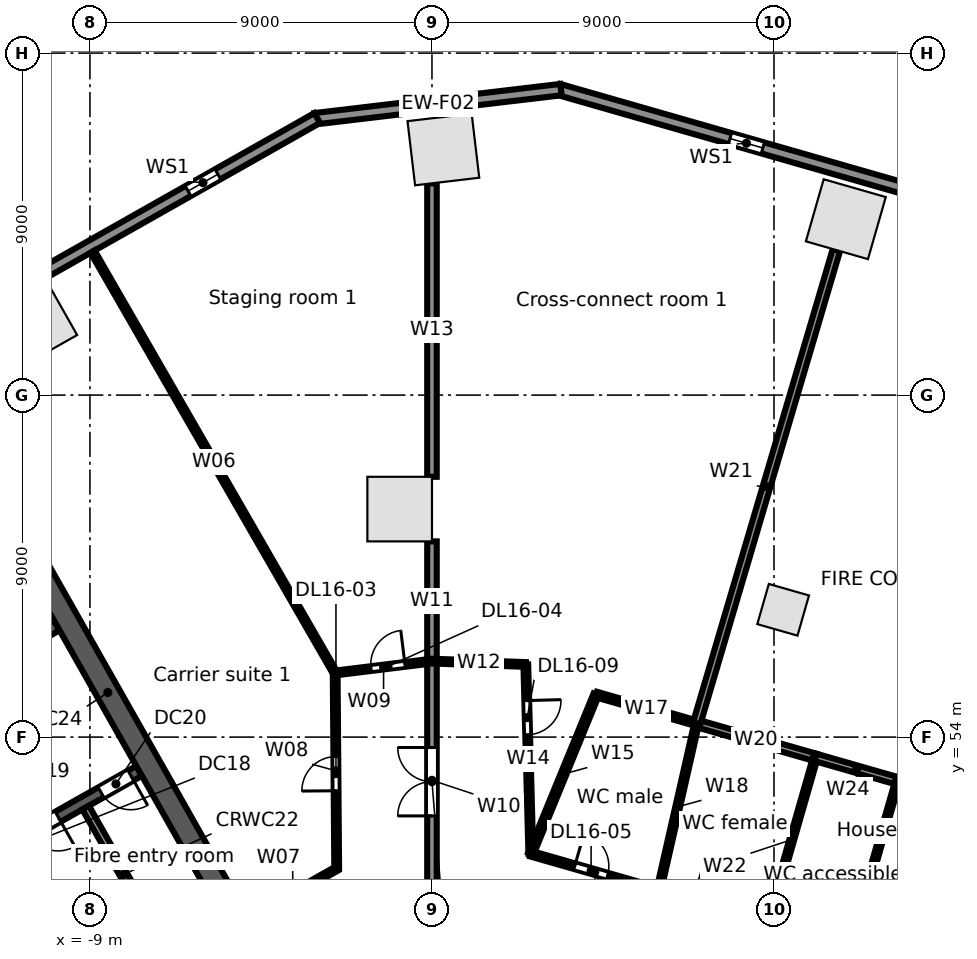
"""IFC4 building model, lengths in metres.
Left out: names, types, materials, properties, quantities, classifications, styles, units other than length and angle.
Written with IfcOpenShell. Run it as: python <this file> out.ifc"""

import sys

from ifc_helpers import new_model, si_unit, direction, frame, frame_2d, origin, origin_2d, place, context, subcontext, project, spatial, rectangle, extrude, element, fill, save


model = new_model("IFC4")
c1 = context("Model", 3, precision=1e-05, world=origin(), true_north=direction((0.0, 1.0)))
c2 = subcontext(c1, "Body", "Model", "MODEL_VIEW")
j1 = project(units=[si_unit("LENGTHUNIT", "METRE"), si_unit("PLANEANGLEUNIT", "RADIAN")], contexts=[c1])
p1 = place(None, origin())
s1 = spatial("IfcSite", under=j1, at=p1, CompositionType="ELEMENT")
p2 = place(p1, origin())
s2 = spatial("IfcBuilding", under=s1, at=p2, CompositionType="ELEMENT")
p3 = place(p2, frame((0.0, 0.0, 86.5)))
s3 = spatial("IfcBuildingStorey", under=s2, at=p3, CompositionType="ELEMENT", Elevation=86.5)
for number, where, z_axis, x_axis in (
    (1, (10.89, 67.629, 0.0), (0.0, 0.0, 1.0), (-0.961, 0.276, 0.0)),
    (2, (0.3, 69.464, 0.0), (0.0, 0.0, 1.0), (-0.993, -0.118, 0.0)),
    (3, (-10.495, 64.902, 0.0), (0.0, 0.0, 1.0), (-0.87, -0.492, 0.0)),
    (4, (-0.85, 60.0, 0.0), (0.0, 0.0, 1.0), (0.0, 1.0, 0.0)),
):
    element("IfcColumn", number, at=place(p3, frame(where, z_axis=z_axis, x_axis=x_axis)), inside=s3, PredefinedType="COLUMN", context=c2, shape_type="SweptSolid", body=[
        extrude(rectangle(XDim=1.7, YDim=1.7, at=origin_2d()), origin(), (0.0, 0.0, 1.0), 5.0),
    ])
p4 = place(p3, frame((9.241, 57.35, 0.0), z_axis=(0.0, 0.0, 1.0), x_axis=(0.961261695938, -0.275637355817, 0.0)))
e5 = element("IfcColumn", 5, at=p4, inside=s3, PredefinedType="COLUMN", context=c2, shape_type="SweptSolid", body=[
    extrude(rectangle(XDim=1.1, YDim=1.1, at=origin_2d()), origin(), (0.0, 0.0, 1.0), 5.0),
])
p5 = place(p3, frame((3.335, 71.044, 0.0), z_axis=(0.0, 0.0, 1.0), x_axis=(0.961260130989, -0.275642813387, 0.0)))
e6 = element("IfcWall", 6, at=p5, inside=s3, PredefinedType="STANDARD", context=c2, shape_type="SweptSolid", body=[
    extrude(rectangle(XDim=32.741, YDim=0.3, at=frame_2d((16.371, 0.0))), origin(), (0.0, 0.0, 1.0), 4.65),
])
p6 = place(p5, frame((29.207, 0.0, 0.6)))
e7 = element("IfcOpeningElement", 7, at=p6, cuts=e6, PredefinedType="OPENING", context=c2, shape_type="SweptSolid", body=[
    extrude(rectangle(XDim=0.9, YDim=3.2, at=frame_2d((0.45, 1.6))), frame((0.0, 0.16, 0.0), z_axis=(0.0, -1.0, 0.0), x_axis=(1.0, 0.0, 0.0)), (0.0, 0.0, 1.0), 0.32),
])
p7 = place(p5, frame((21.034, 0.0, 0.6)))
e8 = element("IfcOpeningElement", 8, at=p7, cuts=e6, PredefinedType="OPENING", context=c2, shape_type="SweptSolid", body=[
    extrude(rectangle(XDim=0.9, YDim=3.2, at=frame_2d((0.45, 1.6))), frame((0.0, 0.16, 0.0), z_axis=(0.0, -1.0, 0.0), x_axis=(1.0, 0.0, 0.0)), (0.0, 0.0, 1.0), 0.32),
])
p8 = place(p5, frame((12.861, 0.0, 0.6)))
e9 = element("IfcOpeningElement", 9, at=p8, cuts=e6, PredefinedType="OPENING", context=c2, shape_type="SweptSolid", body=[
    extrude(rectangle(XDim=0.9, YDim=3.2, at=frame_2d((0.45, 1.6))), frame((0.0, 0.16, 0.0), z_axis=(0.0, -1.0, 0.0), x_axis=(1.0, 0.0, 0.0)), (0.0, 0.0, 1.0), 0.32),
])
p9 = place(p5, frame((4.688, 0.0, 0.6)))
e10 = element("IfcOpeningElement", 10, at=p9, cuts=e6, PredefinedType="OPENING", context=c2, shape_type="SweptSolid", body=[
    extrude(rectangle(XDim=0.9, YDim=3.2, at=frame_2d((0.45, 1.6))), frame((0.0, 0.16, 0.0), z_axis=(0.0, -1.0, 0.0), x_axis=(1.0, 0.0, 0.0)), (0.0, 0.0, 1.0), 0.32),
])
p10 = place(p3, frame((-3.076, 70.273, 0.0), z_axis=(0.0, 0.0, 1.0), x_axis=(0.993067743007, 0.117543429416, 0.0)))
e11 = element("IfcWall", 11, at=p10, inside=s3, PredefinedType="STANDARD", context=c2, shape_type="SweptSolid", body=[
    extrude(rectangle(XDim=6.516, YDim=0.3, at=frame_2d((3.258, 0.0))), origin(), (0.0, 0.0, 1.0), 4.65),
])
p11 = place(p3, frame((-58.745, 38.764, 0.0), z_axis=(0.0, 0.0, 1.0), x_axis=(0.870355811726, 0.492423355453, 0.0)))
e12 = element("IfcWall", 12, at=p11, inside=s3, PredefinedType="STANDARD", context=c2, shape_type="SweptSolid", body=[
    extrude(rectangle(XDim=64.025, YDim=0.3, at=frame_2d((32.013, 0.0))), origin(), (0.0, 0.0, 1.0), 4.65),
])
p12 = place(p11, frame((60.122, 0.0, 0.6)))
e13 = element("IfcOpeningElement", 13, at=p12, cuts=e12, PredefinedType="OPENING", context=c2, shape_type="SweptSolid", body=[
    extrude(rectangle(XDim=0.9, YDim=3.2, at=frame_2d((0.45, 1.6))), frame((0.0, 0.16, 0.0), z_axis=(0.0, -1.0, 0.0), x_axis=(1.0, 0.0, 0.0)), (0.0, 0.0, 1.0), 0.32),
])
p13 = place(p11, frame((50.992, 0.0, 0.6)))
e14 = element("IfcOpeningElement", 14, at=p13, cuts=e12, PredefinedType="OPENING", context=c2, shape_type="SweptSolid", body=[
    extrude(rectangle(XDim=0.9, YDim=3.2, at=frame_2d((0.45, 1.6))), frame((0.0, 0.16, 0.0), z_axis=(0.0, -1.0, 0.0), x_axis=(1.0, 0.0, 0.0)), (0.0, 0.0, 1.0), 0.32),
])
p14 = place(p11, frame((41.862, 0.0, 0.6)))
e15 = element("IfcOpeningElement", 15, at=p14, cuts=e12, PredefinedType="OPENING", context=c2, shape_type="SweptSolid", body=[
    extrude(rectangle(XDim=0.9, YDim=3.2, at=frame_2d((0.45, 1.6))), frame((0.0, 0.16, 0.0), z_axis=(0.0, -1.0, 0.0), x_axis=(1.0, 0.0, 0.0)), (0.0, 0.0, 1.0), 0.32),
])
p15 = place(p11, frame((32.732, 0.0, 0.6)))
e16 = element("IfcOpeningElement", 16, at=p15, cuts=e12, PredefinedType="OPENING", context=c2, shape_type="SweptSolid", body=[
    extrude(rectangle(XDim=0.9, YDim=3.2, at=frame_2d((0.45, 1.6))), frame((0.0, 0.16, 0.0), z_axis=(0.0, -1.0, 0.0), x_axis=(1.0, 0.0, 0.0)), (0.0, 0.0, 1.0), 0.32),
])
p16 = place(p11, frame((23.602, 0.0, 0.6)))
e17 = element("IfcOpeningElement", 17, at=p16, cuts=e12, PredefinedType="OPENING", context=c2, shape_type="SweptSolid", body=[
    extrude(rectangle(XDim=0.9, YDim=3.2, at=frame_2d((0.45, 1.6))), frame((0.0, 0.16, 0.0), z_axis=(0.0, -1.0, 0.0), x_axis=(1.0, 0.0, 0.0)), (0.0, 0.0, 1.0), 0.32),
])
p17 = place(p11, frame((14.472, 0.0, 0.6)))
e18 = element("IfcOpeningElement", 18, at=p17, cuts=e12, PredefinedType="OPENING", context=c2, shape_type="SweptSolid", body=[
    extrude(rectangle(XDim=0.9, YDim=3.2, at=frame_2d((0.45, 1.6))), frame((0.0, 0.16, 0.0), z_axis=(0.0, -1.0, 0.0), x_axis=(1.0, 0.0, 0.0)), (0.0, 0.0, 1.0), 0.32),
])
p18 = place(p11, frame((5.342, 0.0, 0.6)))
e19 = element("IfcOpeningElement", 19, at=p18, cuts=e12, PredefinedType="OPENING", context=c2, shape_type="SweptSolid", body=[
    extrude(rectangle(XDim=0.9, YDim=3.2, at=frame_2d((0.45, 1.6))), frame((0.0, 0.16, 0.0), z_axis=(0.0, -1.0, 0.0), x_axis=(1.0, 0.0, 0.0)), (0.0, 0.0, 1.0), 0.32),
])
p19 = place(p3, frame((-13.365, 49.911, 0.0), z_axis=(0.0, 0.0, 1.0), x_axis=(0.870340995471, 0.49244954219, 0.0)))
e20 = element("IfcWall", 20, at=p19, inside=s3, PredefinedType="SOLIDWALL", context=c2, shape_type="SweptSolid", body=[
    extrude(rectangle(XDim=6.5, YDim=0.3, at=frame_2d((3.25, 0.0))), origin(), (0.0, 0.0, 1.0), 4.65),
])
p20 = place(p19, frame((0.75, 0.0, 0.0)))
e21 = element("IfcOpeningElement", 21, at=p20, cuts=e20, PredefinedType="OPENING", context=c2, shape_type="SweptSolid", body=[
    extrude(rectangle(XDim=0.9, YDim=2.1, at=frame_2d((0.45, 1.05))), frame((0.0, 0.16, 0.0), z_axis=(0.0, -1.0, 0.0), x_axis=(1.0, 0.0, 0.0)), (0.0, 0.0, 1.0), 0.32),
])
p21 = place(p19, frame((3.15, 0.0, 0.0)))
e22 = element("IfcOpeningElement", 22, at=p21, cuts=e20, PredefinedType="OPENING", context=c2, shape_type="SweptSolid", body=[
    extrude(rectangle(XDim=0.9, YDim=2.1, at=frame_2d((0.45, 1.05))), frame((0.0, 0.16, 0.0), z_axis=(0.0, -1.0, 0.0), x_axis=(1.0, 0.0, 0.0)), (0.0, 0.0, 1.0), 0.32),
])
p22 = place(p19, frame((5.35, 0.0, 0.0)))
e23 = element("IfcOpeningElement", 23, at=p22, cuts=e20, PredefinedType="OPENING", context=c2, shape_type="SweptSolid", body=[
    extrude(rectangle(XDim=0.9, YDim=2.1, at=frame_2d((0.45, 1.05))), frame((0.0, 0.16, 0.0), z_axis=(0.0, -1.0, 0.0), x_axis=(1.0, 0.0, 0.0)), (0.0, 0.0, 1.0), 0.32),
])
p23 = place(p3, frame((-15.618, 53.691, 0.0), z_axis=(0.0, 0.0, 1.0), x_axis=(0.870356769198, 0.492421663121, 0.0)))
e24 = element("IfcWall", 24, at=p23, inside=s3, PredefinedType="SOLIDWALL", context=c2, shape_type="SweptSolid", body=[
    extrude(rectangle(XDim=6.6, YDim=0.3, at=frame_2d((3.3, 0.0))), origin(), (0.0, 0.0, 1.0), 4.65),
])
p24 = place(p23, frame((3.0, 0.0, 0.0)))
e25 = element("IfcOpeningElement", 25, at=p24, cuts=e24, PredefinedType="OPENING", context=c2, shape_type="SweptSolid", body=[
    extrude(rectangle(XDim=0.9, YDim=2.1, at=frame_2d((0.45, 1.05))), frame((0.0, 0.16, 0.0), z_axis=(0.0, -1.0, 0.0), x_axis=(1.0, 0.0, 0.0)), (0.0, 0.0, 1.0), 0.32),
])
p25 = place(p3, frame((-11.202, 50.962, 0.0), z_axis=(0.0, 0.0, 1.0), x_axis=(0.49241474071, -0.870360685654, 0.0)))
e26 = element("IfcWall", 26, at=p25, inside=s3, PredefinedType="PARTITIONING", context=c2, shape_type="SweptSolid", body=[
    extrude(rectangle(XDim=4.05, YDim=0.2, at=frame_2d((2.025, 0.0))), origin(), (0.0, 0.0, 1.0), 4.65),
])
p26 = place(p3, frame((-9.113, 52.144, 0.0), z_axis=(0.0, 0.0, 1.0), x_axis=(0.492394910396, -0.870371904542, 0.0)))
e27 = element("IfcWall", 27, at=p26, inside=s3, PredefinedType="PARTITIONING", context=c2, shape_type="SweptSolid", body=[
    extrude(rectangle(XDim=4.05, YDim=0.2, at=frame_2d((2.025, 0.0))), origin(), (0.0, 0.0, 1.0), 4.65),
])
p27 = place(p3, frame((-11.681, 60.744, 0.0), z_axis=(0.0, 0.0, 1.0), x_axis=(0.492426772896, -0.870353878221, 0.0)))
e28 = element("IfcWall", 28, at=p27, inside=s3, PredefinedType="SOLIDWALL", context=c2, shape_type="SweptSolid", body=[
    extrude(rectangle(XDim=12.8, YDim=0.6, at=frame_2d((6.4, 0.0))), origin(), (0.0, 0.0, 1.0), 4.65),
])
p28 = place(p3, frame((-8.931, 66.775, 0.0), z_axis=(0.0, 0.0, 1.0), x_axis=(0.498955759248, -0.866627457627, 0.0)))
e29 = element("IfcWall", 29, at=p28, inside=s3, PredefinedType="PARTITIONING", context=c2, shape_type="SweptSolid", body=[
    extrude(rectangle(XDim=12.794, YDim=0.125, at=frame_2d((6.397, 0.0))), origin(), (0.0, 0.0, 1.0), 3.822),
])
p29 = place(p3, frame((-4.821, 49.23, 0.0), z_axis=(0.0, 0.0, 1.0), x_axis=(0.870371217631, 0.492396124598, 0.0)))
e30 = element("IfcWall", 30, at=p29, inside=s3, PredefinedType="PARTITIONING", context=c2, shape_type="SweptSolid", body=[
    extrude(rectangle(XDim=2.659, YDim=0.125, at=frame_2d((1.329, 0.0))), origin(), (0.0, 0.0, 1.0), 4.65),
])
p30 = place(p3, frame((-2.547, 55.687, 0.0), z_axis=(0.0, 0.0, 1.0), x_axis=(0.007777437156, -0.999969755278, 0.0)))
e31 = element("IfcWall", 31, at=p30, inside=s3, PredefinedType="PARTITIONING", context=c2, shape_type="SweptSolid", body=[
    extrude(rectangle(XDim=5.148, YDim=0.125, at=frame_2d((2.574, 0.0))), origin(), (0.0, 0.0, 1.0), 3.822),
])
p31 = place(p30, frame((2.2, 0.0, 0.0)))
e32 = element("IfcOpeningElement", 32, at=p31, cuts=e31, PredefinedType="OPENING", context=c2, shape_type="SweptSolid", body=[
    extrude(rectangle(XDim=0.9, YDim=2.1, at=frame_2d((0.45, 1.05))), frame((0.0, 0.073, 0.0), z_axis=(0.0, -1.0, 0.0), x_axis=(1.0, 0.0, 0.0)), (0.0, 0.0, 1.0), 0.145),
])
p32 = place(p3, frame((-2.547, 55.687, 0.0), z_axis=(0.0, 0.0, 1.0), x_axis=(0.992534770107, 0.121962002806, 0.0)))
e33 = element("IfcWall", 33, at=p32, inside=s3, PredefinedType="PARTITIONING", context=c2, shape_type="SweptSolid", body=[
    extrude(rectangle(XDim=2.566, YDim=0.125, at=frame_2d((1.283, 0.0))), origin(), (0.0, 0.0, 1.0), 4.65),
])
p33 = place(p32, frame((0.95, 0.0, 0.0)))
e34 = element("IfcOpeningElement", 34, at=p33, cuts=e33, PredefinedType="OPENING", context=c2, shape_type="SweptSolid", body=[
    extrude(rectangle(XDim=0.9, YDim=2.1, at=frame_2d((0.45, 1.05))), frame((0.0, 0.073, 0.0), z_axis=(0.0, -1.0, 0.0), x_axis=(1.0, 0.0, 0.0)), (0.0, 0.0, 1.0), 0.145),
])
p34 = place(p3, frame((0.0, 49.726, 0.0), z_axis=(0.0, 0.0, 1.0), x_axis=(0.0, 1.0, 0.0)))
e35 = element("IfcWall", 35, at=p34, inside=s3, PredefinedType="PARTITIONING", context=c2, shape_type="SweptSolid", body=[
    extrude(rectangle(XDim=6.274, YDim=0.25, at=frame_2d((3.137, 0.0))), origin(), (0.0, 0.0, 1.0), 4.65),
])
p35 = place(p34, frame((2.2, 0.0, 0.0)))
e36 = element("IfcOpeningElement", 36, at=p35, cuts=e35, PredefinedType="OPENING", context=c2, shape_type="SweptSolid", body=[
    extrude(rectangle(XDim=1.8, YDim=2.1, at=frame_2d((0.9, 1.05))), frame((0.0, 0.135, 0.0), z_axis=(0.0, -1.0, 0.0), x_axis=(1.0, 0.0, 0.0)), (0.0, 0.0, 1.0), 0.27),
])
p36 = place(p3, frame((0.0, 56.0, 0.0), z_axis=(0.0, 0.0, 1.0), x_axis=(0.0, 1.0, 0.0)))
e37 = element("IfcWall", 37, at=p36, inside=s3, PredefinedType="PARTITIONING", context=c2, shape_type="SweptSolid", body=[
    extrude(rectangle(XDim=3.15, YDim=0.25, at=frame_2d((1.575, 0.0))), origin(), (0.0, 0.0, 1.0), 4.65),
])
p37 = place(p3, frame((0.0, 56.0, 0.0), z_axis=(0.0, 0.0, 1.0), x_axis=(0.999349313684, -0.036068673934, 0.0)))
e38 = element("IfcWall", 38, at=p37, inside=s3, PredefinedType="PARTITIONING", context=c2, shape_type="SweptSolid", body=[
    extrude(rectangle(XDim=2.471, YDim=0.125, at=frame_2d((1.235, 0.0))), origin(), (0.0, 0.0, 1.0), 4.65),
])
p38 = place(p3, frame((0.0, 60.85, 0.0), z_axis=(0.0, 0.0, 1.0), x_axis=(0.0, 1.0, 0.0)))
e39 = element("IfcWall", 39, at=p38, inside=s3, PredefinedType="PARTITIONING", context=c2, shape_type="SweptSolid", body=[
    extrude(rectangle(XDim=7.723, YDim=0.25, at=frame_2d((3.861, 0.0))), origin(), (0.0, 0.0, 1.0), 3.83),
])
p39 = place(p3, frame((2.469, 55.911, 0.0), z_axis=(0.0, 0.0, 1.0), x_axis=(0.02651808123, -0.999648333849, 0.0)))
e40 = element("IfcWall", 40, at=p39, inside=s3, PredefinedType="PARTITIONING", context=c2, shape_type="SweptSolid", body=[
    extrude(rectangle(XDim=4.981, YDim=0.125, at=frame_2d((2.49, 0.0))), origin(), (0.0, 0.0, 1.0), 4.65),
])
p40 = place(p39, frame((0.95, 0.0, 0.0)))
e41 = element("IfcOpeningElement", 41, at=p40, cuts=e40, PredefinedType="OPENING", context=c2, shape_type="SweptSolid", body=[
    extrude(rectangle(XDim=0.9, YDim=2.1, at=frame_2d((0.45, 1.05))), frame((0.0, 0.073, 0.0), z_axis=(0.0, -1.0, 0.0), x_axis=(1.0, 0.0, 0.0)), (0.0, 0.0, 1.0), 0.145),
])
p41 = place(p3, frame((2.601, 50.932, 0.0), z_axis=(0.0, 0.0, 1.0), x_axis=(0.380066317543, 0.924959239247, 0.0)))
e42 = element("IfcWall", 42, at=p41, inside=s3, PredefinedType="PARTITIONING", context=c2, shape_type="SweptSolid", body=[
    extrude(rectangle(XDim=4.528, YDim=0.15, at=frame_2d((2.264, 0.0))), origin(), (0.0, 0.0, 1.0), 4.65),
])
p42 = place(p3, frame((2.601, 50.932, 0.0), z_axis=(0.0, 0.0, 1.0), x_axis=(0.961265606965, -0.27562371608, 0.0)))
e43 = element("IfcWall", 43, at=p42, inside=s3, PredefinedType="PARTITIONING", context=c2, shape_type="SweptSolid", body=[
    extrude(rectangle(XDim=3.5, YDim=0.15, at=frame_2d((1.75, 0.0))), origin(), (0.0, 0.0, 1.0), 4.65),
])
p43 = place(p42, frame((1.2, 0.0, 0.0)))
e44 = element("IfcOpeningElement", 44, at=p43, cuts=e43, PredefinedType="OPENING", context=c2, shape_type="SweptSolid", body=[
    extrude(rectangle(XDim=0.9, YDim=2.1, at=frame_2d((0.45, 1.05))), frame((0.0, 0.085, 0.0), z_axis=(0.0, -1.0, 0.0), x_axis=(1.0, 0.0, 0.0)), (0.0, 0.0, 1.0), 0.17),
])
p44 = place(p3, frame((4.322, 55.12, 0.0), z_axis=(0.0, 0.0, 1.0), x_axis=(0.961272337704, -0.275600240865, 0.0)))
e45 = element("IfcWall", 45, at=p44, inside=s3, PredefinedType="PARTITIONING", context=c2, shape_type="SweptSolid", body=[
    extrude(rectangle(XDim=2.75, YDim=0.15, at=frame_2d((1.375, 0.0))), origin(), (0.0, 0.0, 1.0), 4.65),
])
p45 = place(p3, frame((5.966, 49.967, 0.0), z_axis=(0.0, 0.0, 1.0), x_axis=(0.221859891223, 0.975078555126, 0.0)))
e46 = element("IfcWall", 46, at=p45, inside=s3, PredefinedType="PARTITIONING", context=c2, shape_type="SweptSolid", body=[
    extrude(rectangle(XDim=4.507, YDim=0.125, at=frame_2d((2.254, 0.0))), origin(), (0.0, 0.0, 1.0), 4.65),
])
p46 = place(p3, frame((6.966, 54.362, 0.0), z_axis=(0.0, 0.0, 1.0), x_axis=(0.961245650832, -0.275693305607, 0.0)))
e47 = element("IfcWall", 47, at=p46, inside=s3, PredefinedType="PARTITIONING", context=c2, shape_type="SweptSolid", body=[
    extrude(rectangle(XDim=3.25, YDim=0.2, at=frame_2d((1.625, 0.0))), origin(), (0.0, 0.0, 1.0), 3.83),
])
p47 = place(p3, frame((6.966, 54.362, 0.0), z_axis=(0.0, 0.0, 1.0), x_axis=(0.283027392509, 0.959111826165, 0.0)))
e48 = element("IfcWall", 48, at=p47, inside=s3, PredefinedType="PARTITIONING", context=c2, shape_type="SweptSolid", body=[
    extrude(rectangle(XDim=12.985, YDim=0.2, at=frame_2d((6.492, 0.0))), origin(), (0.0, 0.0, 1.0), 3.718),
])
p48 = place(p3, frame((8.849, 49.14, 0.0), z_axis=(0.0, 0.0, 1.0), x_axis=(0.275731175537, 0.961234788612, 0.0)))
e49 = element("IfcWall", 49, at=p48, inside=s3, PredefinedType="PARTITIONING", context=c2, shape_type="SweptSolid", body=[
    extrude(rectangle(XDim=4.501, YDim=0.125, at=frame_2d((2.25, 0.0))), origin(), (0.0, 0.0, 1.0), 3.83),
])
p49 = place(p3, frame((10.09, 53.466, 0.0), z_axis=(0.0, 0.0, 1.0), x_axis=(0.961269670038, -0.275609545309, 0.0)))
e50 = element("IfcWall", 50, at=p49, inside=s3, PredefinedType="PARTITIONING", context=c2, shape_type="SweptSolid", body=[
    extrude(rectangle(XDim=2.25, YDim=0.2, at=frame_2d((1.125, 0.0))), origin(), (0.0, 0.0, 1.0), 3.718),
])
p50 = place(p3, frame((11.012, 48.52, 0.0), z_axis=(0.0, 0.0, 1.0), x_axis=(0.275745553681, 0.96123066411, 0.0)))
e51 = element("IfcWall", 51, at=p50, inside=s3, PredefinedType="PARTITIONING", context=c2, shape_type="SweptSolid", body=[
    extrude(rectangle(XDim=4.5, YDim=0.125, at=frame_2d((2.25, 0.0))), origin(), (0.0, 0.0, 1.0), 4.65),
])
p51 = place(p9, origin())
e52 = element("IfcWindow", 52, at=p51, inside=s3, PartitioningType="SINGLE_PANEL", PredefinedType="WINDOW", context=c2, shape_type="SweptSolid", body=[
    extrude(rectangle(XDim=0.9, YDim=3.2, at=frame_2d((0.45, 1.6))), frame((0.0, 0.03, 0.0), z_axis=(0.0, -1.0, 0.0), x_axis=(1.0, 0.0, 0.0)), (0.0, 0.0, 1.0), 0.06),
])
fill(e10, e52)
p52 = place(p12, origin())
e53 = element("IfcWindow", 53, at=p52, inside=s3, PartitioningType="SINGLE_PANEL", PredefinedType="WINDOW", context=c2, shape_type="SweptSolid", body=[
    extrude(rectangle(XDim=0.9, YDim=3.2, at=frame_2d((0.45, 1.6))), frame((0.0, 0.03, 0.0), z_axis=(0.0, -1.0, 0.0), x_axis=(1.0, 0.0, 0.0)), (0.0, 0.0, 1.0), 0.06),
])
fill(e13, e53)
p53 = place(p21, frame((0.9, 0.0, 0.0), z_axis=(0.0, 0.0, 1.0), x_axis=(-1.0, 0.0, 0.0)))
e54 = element("IfcDoor", 54, at=p53, inside=s3, OperationType="SINGLE_SWING_LEFT", PredefinedType="DOOR", context=c2, shape_type="SweptSolid", body=[
    extrude(rectangle(XDim=0.9, YDim=2.1, at=frame_2d((0.45, 1.05))), frame((0.0, 0.025, 0.0), z_axis=(0.0, -1.0, 0.0), x_axis=(1.0, 0.0, 0.0)), (0.0, 0.0, 1.0), 0.05),
])
fill(e22, e54)
p54 = place(p22, frame((0.9, 0.0, 0.0), z_axis=(0.0, 0.0, 1.0), x_axis=(-1.0, 0.0, 0.0)))
e55 = element("IfcDoor", 55, at=p54, inside=s3, OperationType="SINGLE_SWING_LEFT", PredefinedType="DOOR", context=c2, shape_type="SweptSolid", body=[
    extrude(rectangle(XDim=0.9, YDim=2.1, at=frame_2d((0.45, 1.05))), frame((0.0, 0.025, 0.0), z_axis=(0.0, -1.0, 0.0), x_axis=(1.0, 0.0, 0.0)), (0.0, 0.0, 1.0), 0.05),
])
fill(e23, e55)
p55 = place(p31, frame((0.9, 0.0, 0.0), z_axis=(0.0, 0.0, 1.0), x_axis=(-1.0, 0.0, 0.0)))
e56 = element("IfcDoor", 56, at=p55, inside=s3, OperationType="SINGLE_SWING_LEFT", PredefinedType="DOOR", context=c2, shape_type="SweptSolid", body=[
    extrude(rectangle(XDim=0.9, YDim=2.1, at=frame_2d((0.45, 1.05))), frame((0.0, 0.025, 0.0), z_axis=(0.0, -1.0, 0.0), x_axis=(1.0, 0.0, 0.0)), (0.0, 0.0, 1.0), 0.05),
])
fill(e32, e56)
p56 = place(p33, origin())
e57 = element("IfcDoor", 57, at=p56, inside=s3, OperationType="SINGLE_SWING_RIGHT", PredefinedType="DOOR", context=c2, shape_type="SweptSolid", body=[
    extrude(rectangle(XDim=0.9, YDim=2.1, at=frame_2d((0.45, 1.05))), frame((0.0, 0.025, 0.0), z_axis=(0.0, -1.0, 0.0), x_axis=(1.0, 0.0, 0.0)), (0.0, 0.0, 1.0), 0.05),
])
fill(e34, e57)
p57 = place(p43, origin())
e58 = element("IfcDoor", 58, at=p57, inside=s3, OperationType="SINGLE_SWING_LEFT", PredefinedType="DOOR", context=c2, shape_type="SweptSolid", body=[
    extrude(rectangle(XDim=0.9, YDim=2.1, at=frame_2d((0.45, 1.05))), frame((0.0, 0.025, 0.0), z_axis=(0.0, -1.0, 0.0), x_axis=(1.0, 0.0, 0.0)), (0.0, 0.0, 1.0), 0.05),
])
fill(e44, e58)
p58 = place(p40, origin())
e59 = element("IfcDoor", 59, at=p58, inside=s3, OperationType="SINGLE_SWING_LEFT", PredefinedType="DOOR", context=c2, shape_type="SweptSolid", body=[
    extrude(rectangle(XDim=0.9, YDim=2.1, at=frame_2d((0.45, 1.05))), frame((0.0, 0.025, 0.0), z_axis=(0.0, -1.0, 0.0), x_axis=(1.0, 0.0, 0.0)), (0.0, 0.0, 1.0), 0.05),
])
fill(e41, e59)
p59 = place(p35, origin())
e60 = element("IfcDoor", 60, at=p59, inside=s3, OperationType="DOUBLE_DOOR_SINGLE_SWING", PredefinedType="DOOR", context=c2, shape_type="SweptSolid", body=[
    extrude(rectangle(XDim=1.8, YDim=2.1, at=frame_2d((0.9, 1.05))), frame((0.0, 0.025, 0.0), z_axis=(0.0, -1.0, 0.0), x_axis=(1.0, 0.0, 0.0)), (0.0, 0.0, 1.0), 0.05),
])
fill(e36, e60)
save(model, sys.argv[1])
